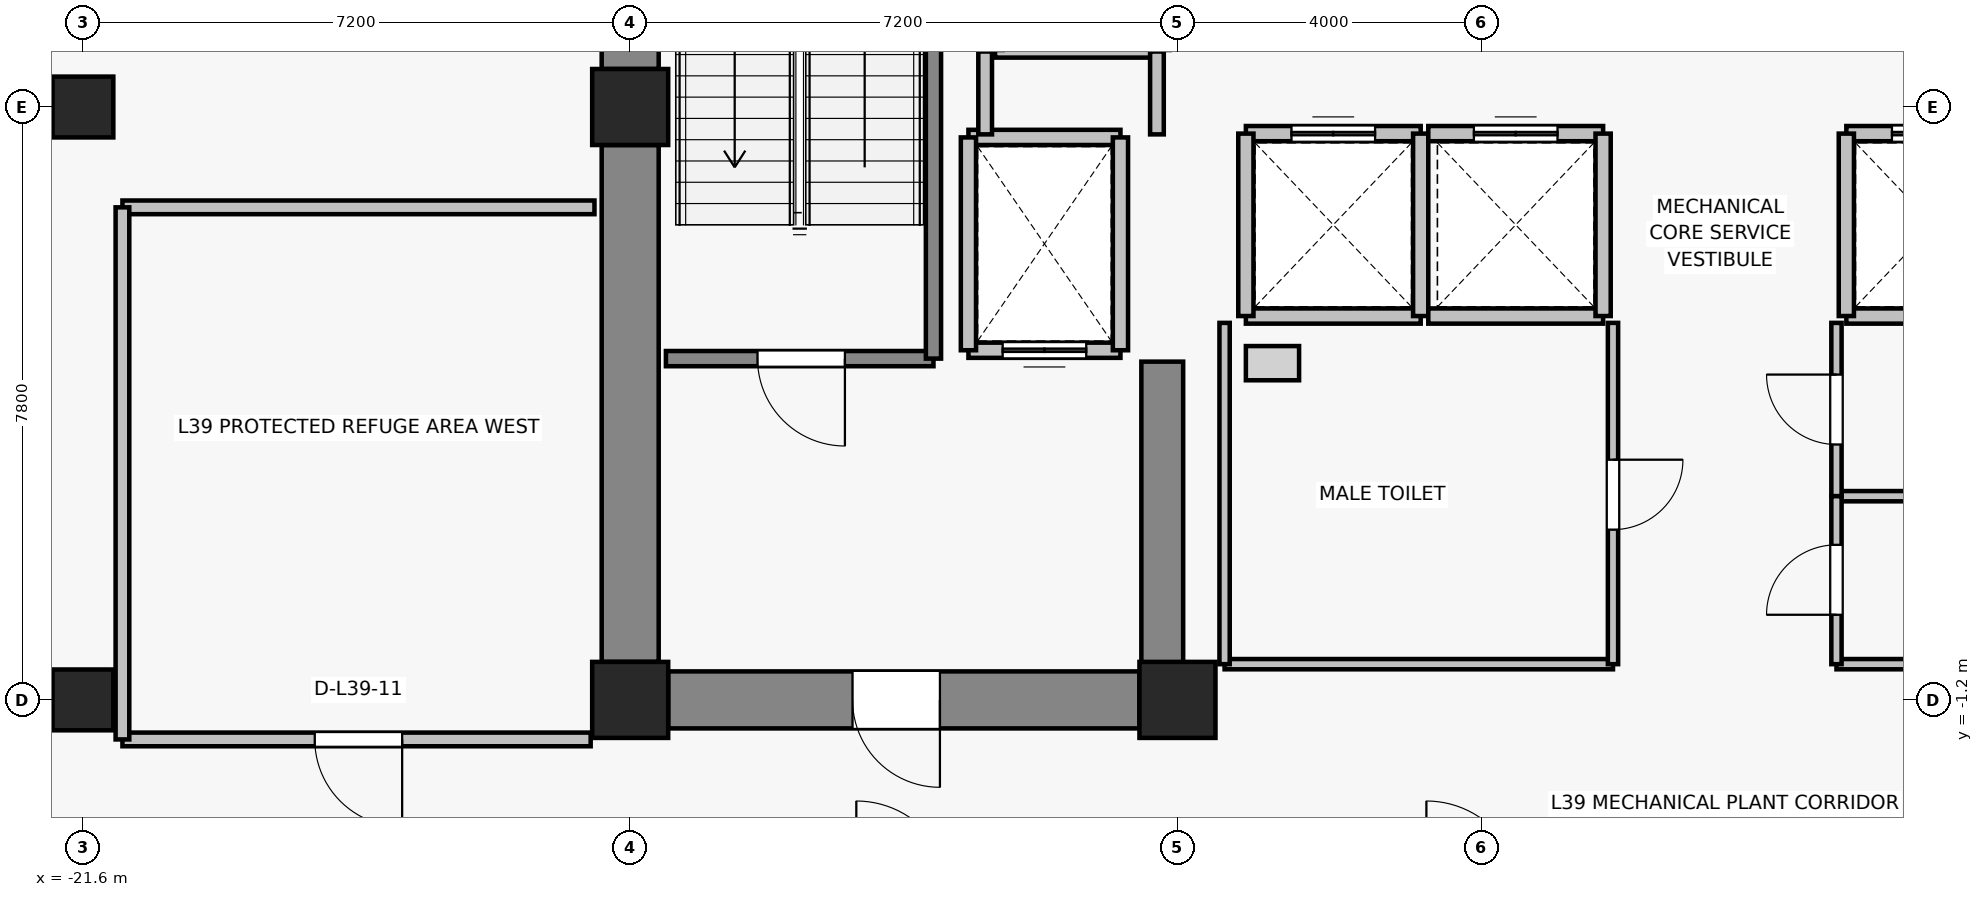
"""IFC4 building model, lengths in metres.
Left out: names, types, materials, properties, quantities, classifications, styles, units other than length and angle.
Written with IfcOpenShell. Run it as: python <this file> out.ifc"""

import sys

from ifc_helpers import new_model, si_unit, direction, frame, frame_2d, origin, origin_2d, place, context, subcontext, project, spatial, rectangle, extrude, source, transform, mapped, element, fill, save


model = new_model("IFC4")
c1 = context("Model", 3, precision=1e-05, world=origin(), true_north=direction((0.0, 1.0)))
c2 = subcontext(c1, "Body", "Model", "MODEL_VIEW")
j1 = project(units=[si_unit("LENGTHUNIT", "METRE"), si_unit("PLANEANGLEUNIT", "RADIAN")], contexts=[c1])
p1 = place(None, origin())
s1 = spatial("IfcSite", under=j1, at=p1, CompositionType="ELEMENT")
p2 = place(p1, origin())
s2 = spatial("IfcBuilding", under=s1, at=p2, CompositionType="ELEMENT")
p3 = place(p2, frame((0.0, 0.0, 139.6)))
s3 = spatial("IfcBuildingStorey", under=s2, at=p3, CompositionType="ELEMENT", Elevation=139.6)
for number, where, z_axis, x_axis in (
    (1, (-14.4, -1.2, 0.0), (0.0, 0.0, 1.0), (1.0, 0.0, 0.0)),
    (2, (-7.2, -1.2, 0.0), (0.0, 0.0, 1.0), (1.0, 0.0, 0.0)),
    (3, (-14.4, 6.6, 0.0), (0.0, 0.0, 1.0), (1.0, 0.0, 0.0)),
):
    element("IfcColumn", number, at=place(p3, frame(where, z_axis=z_axis, x_axis=x_axis)), inside=s3, PredefinedType="COLUMN", context=c2, shape_type="SweptSolid", body=[
        extrude(rectangle(XDim=1.0, YDim=1.0, at=origin_2d()), origin(), (0.0, 0.0, 1.0), 6.6),
    ])
for number, where, z_axis, x_axis in (
    (4, (-21.6, -1.2, 0.0), (0.0, 0.0, 1.0), (1.0, 0.0, 0.0)),
    (5, (-21.6, 6.6, 0.0), (0.0, 0.0, 1.0), (1.0, 0.0, 0.0)),
):
    element("IfcColumn", number, at=place(p3, frame(where, z_axis=z_axis, x_axis=x_axis)), inside=s3, PredefinedType="COLUMN", context=c2, shape_type="SweptSolid", body=[
        extrude(rectangle(XDim=0.8, YDim=0.8, at=origin_2d()), origin(), (0.0, 0.0, 1.0), 6.6),
    ])
p4 = place(p3, frame((-14.4, -0.7, 0.0), z_axis=(0.0, 0.0, 1.0), x_axis=(0.0, 1.0, 0.0)))
e6 = element("IfcWall", 6, at=p4, inside=s3, PredefinedType="SHEAR", context=c2, shape_type="SweptSolid", body=[
    extrude(rectangle(XDim=6.8, YDim=0.75, at=frame_2d((3.4, 0.0))), origin(), (0.0, 0.0, 1.0), 6.375),
])
p5 = place(p3, frame((-14.4, 7.1, 0.0), z_axis=(0.0, 0.0, 1.0), x_axis=(0.0, 1.0, 0.0)))
e7 = element("IfcWall", 7, at=p5, inside=s3, PredefinedType="SHEAR", context=c2, shape_type="SweptSolid", body=[
    extrude(rectangle(XDim=5.9, YDim=0.75, at=frame_2d((2.95, 0.0))), origin(), (0.0, 0.0, 1.0), 6.375),
])
p6 = place(p3, frame((-7.7, -1.2, 0.0), z_axis=(0.0, 0.0, 1.0), x_axis=(-1.0, 0.0, 0.0)))
e8 = element("IfcWall", 8, at=p6, inside=s3, PredefinedType="SHEAR", context=c2, shape_type="SweptSolid", body=[
    extrude(rectangle(XDim=6.2, YDim=0.75, at=frame_2d((3.1, 0.0))), origin(), (0.0, 0.0, 1.0), 6.375),
])
p7 = place(p6, frame((2.625, 0.0, 0.0)))
e9 = element("IfcOpeningElement", 9, at=p7, cuts=e8, PredefinedType="OPENING", context=c2, shape_type="SweptSolid", body=[
    extrude(rectangle(XDim=1.15, YDim=2.15, at=frame_2d((0.575, 1.075))), frame((0.0, 0.385, 0.0), z_axis=(0.0, -1.0, 0.0), x_axis=(1.0, 0.0, 0.0)), (0.0, 0.0, 1.0), 0.77),
])
p8 = place(p3, frame((-7.4, -0.825, 0.0), z_axis=(0.0, 0.0, 1.0), x_axis=(0.0, 1.0, 0.0)))
e10 = element("IfcWall", 10, at=p8, inside=s3, PredefinedType="SHEAR", context=c2, shape_type="SweptSolid", body=[
    extrude(rectangle(XDim=4.075, YDim=0.55, at=frame_2d((2.038, 0.0))), origin(), (0.0, 0.0, 1.0), 6.375),
])
p9 = place(p3, frame((-7.95, 3.4, 0.0), z_axis=(0.0, 0.0, 1.0), x_axis=(-1.0, 0.0, 0.0)))
e11 = element("IfcWall", 11, at=p9, inside=s3, PredefinedType="SOLIDWALL", context=c2, shape_type="SweptSolid", body=[
    extrude(rectangle(XDim=2.0, YDim=0.2, at=frame_2d((1.0, 0.0))), origin(), (0.0, 0.0, 1.0), 6.375),
])
p10 = place(p9, frame((0.45, 0.0, 0.0)))
e12 = element("IfcOpeningElement", 12, at=p10, cuts=e11, PredefinedType="OPENING", context=c2, shape_type="SweptSolid", body=[
    extrude(rectangle(XDim=1.1, YDim=2.2, at=frame_2d((0.55, 1.1))), frame((0.0, 0.11, 0.0), z_axis=(0.0, -1.0, 0.0), x_axis=(1.0, 0.0, 0.0)), (0.0, 0.0, 1.0), 0.22),
])
p11 = place(p3, frame((-9.95, 6.2, 0.0), z_axis=(0.0, 0.0, 1.0), x_axis=(1.0, 0.0, 0.0)))
e13 = element("IfcWall", 13, at=p11, inside=s3, PredefinedType="SOLIDWALL", context=c2, shape_type="SweptSolid", body=[
    extrude(rectangle(XDim=2.0, YDim=0.2, at=frame_2d((1.0, 0.0))), origin(), (0.0, 0.0, 1.0), 6.375),
])
for number, where, z_axis, x_axis in (
    (14, (-9.95, 3.4, 0.0), (0.0, 0.0, 1.0), (0.0, 1.0, 0.0)),
    (15, (-7.95, 6.2, 0.0), (0.0, 0.0, 1.0), (0.0, -1.0, 0.0)),
):
    element("IfcWall", number, at=place(p3, frame(where, z_axis=z_axis, x_axis=x_axis)), inside=s3, PredefinedType="SOLIDWALL", context=c2, shape_type="SweptSolid", body=[
        extrude(rectangle(XDim=2.8, YDim=0.2, at=frame_2d((1.4, 0.0))), origin(), (0.0, 0.0, 1.0), 6.375),
    ])
p12 = place(p3, frame((-4.0, 3.85, 0.0), z_axis=(0.0, 0.0, 1.0), x_axis=(-1.0, 0.0, 0.0)))
e16 = element("IfcWall", 16, at=p12, inside=s3, PredefinedType="SOLIDWALL", context=c2, shape_type="SweptSolid", body=[
    extrude(rectangle(XDim=2.3, YDim=0.2, at=frame_2d((1.15, 0.0))), origin(), (0.0, 0.0, 1.0), 6.375),
])
p13 = place(p3, frame((-6.3, 6.25, 0.0), z_axis=(0.0, 0.0, 1.0), x_axis=(1.0, 0.0, 0.0)))
e17 = element("IfcWall", 17, at=p13, inside=s3, PredefinedType="SOLIDWALL", context=c2, shape_type="SweptSolid", body=[
    extrude(rectangle(XDim=2.3, YDim=0.2, at=frame_2d((1.15, 0.0))), origin(), (0.0, 0.0, 1.0), 6.375),
])
p14 = place(p13, frame((0.6, 0.0, 0.0)))
e18 = element("IfcOpeningElement", 18, at=p14, cuts=e17, PredefinedType="OPENING", context=c2, shape_type="SweptSolid", body=[
    extrude(rectangle(XDim=1.1, YDim=2.2, at=frame_2d((0.55, 1.1))), frame((0.0, 0.11, 0.0), z_axis=(0.0, -1.0, 0.0), x_axis=(1.0, 0.0, 0.0)), (0.0, 0.0, 1.0), 0.22),
])
for number, where, z_axis, x_axis in (
    (19, (-6.3, 3.85, 0.0), (0.0, 0.0, 1.0), (0.0, 1.0, 0.0)),
    (20, (-4.0, 6.25, 0.0), (0.0, 0.0, 1.0), (0.0, -1.0, 0.0)),
):
    element("IfcWall", number, at=place(p3, frame(where, z_axis=z_axis, x_axis=x_axis)), inside=s3, PredefinedType="SOLIDWALL", context=c2, shape_type="SweptSolid", body=[
        extrude(rectangle(XDim=2.4, YDim=0.2, at=frame_2d((1.2, 0.0))), origin(), (0.0, 0.0, 1.0), 6.375),
    ])
p15 = place(p3, frame((-1.6, 3.85, 0.0), z_axis=(0.0, 0.0, 1.0), x_axis=(-1.0, 0.0, 0.0)))
e21 = element("IfcWall", 21, at=p15, inside=s3, PredefinedType="SOLIDWALL", context=c2, shape_type="SweptSolid", body=[
    extrude(rectangle(XDim=2.3, YDim=0.2, at=frame_2d((1.15, 0.0))), origin(), (0.0, 0.0, 1.0), 6.375),
])
p16 = place(p3, frame((-3.9, 6.25, 0.0), z_axis=(0.0, 0.0, 1.0), x_axis=(1.0, 0.0, 0.0)))
e22 = element("IfcWall", 22, at=p16, inside=s3, PredefinedType="SOLIDWALL", context=c2, shape_type="SweptSolid", body=[
    extrude(rectangle(XDim=2.3, YDim=0.2, at=frame_2d((1.15, 0.0))), origin(), (0.0, 0.0, 1.0), 6.375),
])
p17 = place(p16, frame((0.6, 0.0, 0.0)))
e23 = element("IfcOpeningElement", 23, at=p17, cuts=e22, PredefinedType="OPENING", context=c2, shape_type="SweptSolid", body=[
    extrude(rectangle(XDim=1.1, YDim=2.2, at=frame_2d((0.55, 1.1))), frame((0.0, 0.11, 0.0), z_axis=(0.0, -1.0, 0.0), x_axis=(1.0, 0.0, 0.0)), (0.0, 0.0, 1.0), 0.22),
])
p18 = place(p3, frame((-1.6, 6.25, 0.0), z_axis=(0.0, 0.0, 1.0), x_axis=(0.0, -1.0, 0.0)))
e24 = element("IfcWall", 24, at=p18, inside=s3, PredefinedType="SOLIDWALL", context=c2, shape_type="SweptSolid", body=[
    extrude(rectangle(XDim=2.4, YDim=0.2, at=frame_2d((1.2, 0.0))), origin(), (0.0, 0.0, 1.0), 6.375),
])
p19 = place(p3, frame((3.9, 3.85, 0.0), z_axis=(0.0, 0.0, 1.0), x_axis=(-1.0, 0.0, 0.0)))
e25 = element("IfcWall", 25, at=p19, inside=s3, PredefinedType="SOLIDWALL", context=c2, shape_type="SweptSolid", body=[
    extrude(rectangle(XDim=2.3, YDim=0.2, at=frame_2d((1.15, 0.0))), origin(), (0.0, 0.0, 1.0), 6.375),
])
p20 = place(p3, frame((1.6, 6.25, 0.0), z_axis=(0.0, 0.0, 1.0), x_axis=(1.0, 0.0, 0.0)))
e26 = element("IfcWall", 26, at=p20, inside=s3, PredefinedType="SOLIDWALL", context=c2, shape_type="SweptSolid", body=[
    extrude(rectangle(XDim=2.3, YDim=0.2, at=frame_2d((1.15, 0.0))), origin(), (0.0, 0.0, 1.0), 6.375),
])
p21 = place(p20, frame((0.6, 0.0, 0.0)))
e27 = element("IfcOpeningElement", 27, at=p21, cuts=e26, PredefinedType="OPENING", context=c2, shape_type="SweptSolid", body=[
    extrude(rectangle(XDim=1.1, YDim=2.2, at=frame_2d((0.55, 1.1))), frame((0.0, 0.11, 0.0), z_axis=(0.0, -1.0, 0.0), x_axis=(1.0, 0.0, 0.0)), (0.0, 0.0, 1.0), 0.22),
])
p22 = place(p3, frame((1.6, 3.85, 0.0), z_axis=(0.0, 0.0, 1.0), x_axis=(0.0, 1.0, 0.0)))
e28 = element("IfcWall", 28, at=p22, inside=s3, PredefinedType="SOLIDWALL", context=c2, shape_type="SweptSolid", body=[
    extrude(rectangle(XDim=2.4, YDim=0.2, at=frame_2d((1.2, 0.0))), origin(), (0.0, 0.0, 1.0), 6.375),
])
p23 = place(p3, frame((-7.4, 7.35, 0.0), z_axis=(0.0, 0.0, 1.0), x_axis=(-1.0, 0.0, 0.0)))
e29 = element("IfcWall", 29, at=p23, inside=s3, PredefinedType="SOLIDWALL", context=c2, shape_type="SweptSolid", body=[
    extrude(rectangle(XDim=2.2, YDim=0.2, at=frame_2d((1.1, 0.0))), origin(), (0.0, 0.0, 1.0), 5.865),
])
p24 = place(p3, frame((-10.41, 3.29, 0.0), z_axis=(0.0, 0.0, 1.0), x_axis=(-1.0, 0.0, 0.0)))
e30 = element("IfcWall", 30, at=p24, inside=s3, PredefinedType="SOLIDWALL", context=c2, shape_type="SweptSolid", body=[
    extrude(rectangle(XDim=3.52, YDim=0.2, at=frame_2d((1.76, 0.0))), origin(), (0.0, 0.0, 1.0), 6.375),
])
p25 = place(p24, frame((1.165, 0.0, 0.0)))
e31 = element("IfcOpeningElement", 31, at=p25, cuts=e30, PredefinedType="OPENING", context=c2, shape_type="SweptSolid", body=[
    extrude(rectangle(XDim=1.15, YDim=2.15, at=frame_2d((0.575, 1.075))), frame((0.0, 0.11, 0.0), z_axis=(0.0, -1.0, 0.0), x_axis=(1.0, 0.0, 0.0)), (0.0, 0.0, 1.0), 0.22),
])
p26 = place(p3, frame((-10.41, 12.13, 0.0), z_axis=(0.0, 0.0, 1.0), x_axis=(0.0, -1.0, 0.0)))
e32 = element("IfcWall", 32, at=p26, inside=s3, PredefinedType="SOLIDWALL", context=c2, shape_type="SweptSolid", body=[
    extrude(rectangle(XDim=8.84, YDim=0.2, at=frame_2d((4.42, 0.0))), origin(), (0.0, 0.0, 1.0), 6.375),
])
p27 = place(p3, frame((-9.73, 6.24, 0.0), z_axis=(0.0, 0.0, 1.0), x_axis=(0.0, 1.0, 0.0)))
e33 = element("IfcWall", 33, at=p27, inside=s3, PredefinedType="PARTITIONING", context=c2, shape_type="SweptSolid", body=[
    extrude(rectangle(XDim=1.09, YDim=0.18, at=frame_2d((0.545, 0.0))), origin(), (0.0, 0.0, 1.0), 6.375),
])
p28 = place(p3, frame((-7.47, 7.33, 0.0), z_axis=(0.0, 0.0, 1.0), x_axis=(0.0, -1.0, 0.0)))
e34 = element("IfcWall", 34, at=p28, inside=s3, PredefinedType="PARTITIONING", context=c2, shape_type="SweptSolid", body=[
    extrude(rectangle(XDim=1.09, YDim=0.18, at=frame_2d((0.545, 0.0))), origin(), (0.0, 0.0, 1.0), 5.865),
])
p29 = place(p3, frame((-1.47, -0.73, 0.0), z_axis=(0.0, 0.0, 1.0), x_axis=(-1.0, 0.0, 0.0)))
e35 = element("IfcWall", 35, at=p29, inside=s3, PredefinedType="PARTITIONING", context=c2, shape_type="SweptSolid", body=[
    extrude(rectangle(XDim=5.11, YDim=0.135, at=frame_2d((2.555, 0.0))), origin(), (0.0, 0.0, 1.0), 6.375),
])
p30 = place(p3, frame((-6.58, -0.73, 0.0), z_axis=(0.0, 0.0, 1.0), x_axis=(0.0, 1.0, 0.0)))
e36 = element("IfcWall", 36, at=p30, inside=s3, PredefinedType="PARTITIONING", context=c2, shape_type="SweptSolid", body=[
    extrude(rectangle(XDim=4.49, YDim=0.135, at=frame_2d((2.245, 0.0))), origin(), (0.0, 0.0, 1.0), 6.375),
])
p31 = place(p3, frame((-1.47, 3.76, 0.0), z_axis=(0.0, 0.0, 1.0), x_axis=(0.0, -1.0, 0.0)))
e37 = element("IfcWall", 37, at=p31, inside=s3, PredefinedType="PARTITIONING", context=c2, shape_type="SweptSolid", body=[
    extrude(rectangle(XDim=4.49, YDim=0.135, at=frame_2d((2.245, 0.0))), origin(), (0.0, 0.0, 1.0), 6.375),
])
p32 = place(p31, frame((1.8, 0.0, 0.0)))
e38 = element("IfcOpeningElement", 38, at=p32, cuts=e37, PredefinedType="OPENING", context=c2, shape_type="SweptSolid", body=[
    extrude(rectangle(XDim=0.92, YDim=2.1, at=frame_2d((0.46, 1.05))), frame((0.0, 0.077, 0.0), z_axis=(0.0, -1.0, 0.0), x_axis=(1.0, 0.0, 0.0)), (0.0, 0.0, 1.0), 0.155),
])
p33 = place(p3, frame((6.58, 1.48, 0.0), z_axis=(0.0, 0.0, 1.0), x_axis=(-1.0, 0.0, 0.0)))
e39 = element("IfcWall", 39, at=p33, inside=s3, PredefinedType="PARTITIONING", context=c2, shape_type="SweptSolid", body=[
    extrude(rectangle(XDim=5.11, YDim=0.135, at=frame_2d((2.555, 0.0))), origin(), (0.0, 0.0, 1.0), 6.375),
])
p34 = place(p3, frame((1.47, 1.48, 0.0), z_axis=(0.0, 0.0, 1.0), x_axis=(0.0, 1.0, 0.0)))
e40 = element("IfcWall", 40, at=p34, inside=s3, PredefinedType="PARTITIONING", context=c2, shape_type="SweptSolid", body=[
    extrude(rectangle(XDim=2.28, YDim=0.135, at=frame_2d((1.14, 0.0))), origin(), (0.0, 0.0, 1.0), 6.375),
])
p35 = place(p34, frame((0.68, 0.0, 0.0)))
e41 = element("IfcOpeningElement", 41, at=p35, cuts=e40, PredefinedType="OPENING", context=c2, shape_type="SweptSolid", body=[
    extrude(rectangle(XDim=0.92, YDim=2.1, at=frame_2d((0.46, 1.05))), frame((0.0, 0.077, 0.0), z_axis=(0.0, -1.0, 0.0), x_axis=(1.0, 0.0, 0.0)), (0.0, 0.0, 1.0), 0.155),
])
p36 = place(p3, frame((4.18, -0.73, 0.0), z_axis=(0.0, 0.0, 1.0), x_axis=(-1.0, 0.0, 0.0)))
e42 = element("IfcWall", 42, at=p36, inside=s3, PredefinedType="PARTITIONING", context=c2, shape_type="SweptSolid", body=[
    extrude(rectangle(XDim=2.71, YDim=0.135, at=frame_2d((1.355, 0.0))), origin(), (0.0, 0.0, 1.0), 6.375),
])
p37 = place(p3, frame((1.47, -0.73, 0.0), z_axis=(0.0, 0.0, 1.0), x_axis=(0.0, 1.0, 0.0)))
e43 = element("IfcWall", 43, at=p37, inside=s3, PredefinedType="PARTITIONING", context=c2, shape_type="SweptSolid", body=[
    extrude(rectangle(XDim=2.21, YDim=0.135, at=frame_2d((1.105, 0.0))), origin(), (0.0, 0.0, 1.0), 6.375),
])
p38 = place(p37, frame((0.65, 0.0, 0.0)))
e44 = element("IfcOpeningElement", 44, at=p38, cuts=e43, PredefinedType="OPENING", context=c2, shape_type="SweptSolid", body=[
    extrude(rectangle(XDim=0.92, YDim=2.1, at=frame_2d((0.46, 1.05))), frame((0.0, 0.077, 0.0), z_axis=(0.0, -1.0, 0.0), x_axis=(1.0, 0.0, 0.0)), (0.0, 0.0, 1.0), 0.155),
])
p39 = place(p3, frame((-14.92, -1.72, 0.0), z_axis=(0.0, 0.0, 1.0), x_axis=(-1.0, 0.0, 0.0)))
e45 = element("IfcWall", 45, at=p39, inside=s3, PredefinedType="PARTITIONING", context=c2, shape_type="SweptSolid", body=[
    extrude(rectangle(XDim=6.16, YDim=0.18, at=frame_2d((3.08, 0.0))), origin(), (0.0, 0.0, 1.0), 6.375),
])
p40 = place(p39, frame((2.48, 0.0, 0.0)))
e46 = element("IfcOpeningElement", 46, at=p40, cuts=e45, PredefinedType="OPENING", context=c2, shape_type="SweptSolid", body=[
    extrude(rectangle(XDim=1.15, YDim=2.15, at=frame_2d((0.575, 1.075))), frame((0.0, 0.1, 0.0), z_axis=(0.0, -1.0, 0.0), x_axis=(1.0, 0.0, 0.0)), (0.0, 0.0, 1.0), 0.2),
])
p41 = place(p3, frame((-21.08, 5.28, 0.0), z_axis=(0.0, 0.0, 1.0), x_axis=(1.0, 0.0, 0.0)))
e47 = element("IfcWall", 47, at=p41, inside=s3, PredefinedType="PARTITIONING", context=c2, shape_type="SweptSolid", body=[
    extrude(rectangle(XDim=6.21, YDim=0.18, at=frame_2d((3.105, 0.0))), origin(), (0.0, 0.0, 1.0), 6.375),
])
p42 = place(p3, frame((-21.08, -1.72, 0.0), z_axis=(0.0, 0.0, 1.0), x_axis=(0.0, 1.0, 0.0)))
e48 = element("IfcWall", 48, at=p42, inside=s3, PredefinedType="PARTITIONING", context=c2, shape_type="SweptSolid", body=[
    extrude(rectangle(XDim=7.0, YDim=0.18, at=frame_2d((3.5, 0.0))), origin(), (0.0, 0.0, 1.0), 6.375),
])
m1 = source(origin(), c2, "Body", "SweptSolid", [
    extrude(rectangle(XDim=1.1, YDim=2.2, at=frame_2d((0.55, 1.1))), frame((0.0, 0.025, 0.0), z_axis=(0.0, -1.0, 0.0), x_axis=(1.0, 0.0, 0.0)), (0.0, 0.0, 1.0), 0.05),
])
p43 = place(p10, origin())
e49 = element("IfcDoor", 49, at=p43, inside=s3, OperationType="DOUBLE_DOOR_SLIDING", PredefinedType="DOOR", context=c2, shape_type="MappedRepresentation", body=[
    mapped(m1, transform((0.0, 0.0, 0.0), x_axis=(1.0, 0.0, 0.0), y_axis=(0.0, 1.0, 0.0), z_axis=(0.0, 0.0, 1.0), scale=1.0)),
])
fill(e12, e49)
p44 = place(p14, origin())
e50 = element("IfcDoor", 50, at=p44, inside=s3, OperationType="DOUBLE_DOOR_SLIDING", PredefinedType="DOOR", context=c2, shape_type="MappedRepresentation", body=[
    mapped(m1, transform((0.0, 0.0, 0.0), x_axis=(1.0, 0.0, 0.0), y_axis=(0.0, 1.0, 0.0), z_axis=(0.0, 0.0, 1.0), scale=1.0)),
])
fill(e18, e50)
p45 = place(p17, origin())
e51 = element("IfcDoor", 51, at=p45, inside=s3, OperationType="DOUBLE_DOOR_SLIDING", PredefinedType="DOOR", context=c2, shape_type="MappedRepresentation", body=[
    mapped(m1, transform((0.0, 0.0, 0.0), x_axis=(1.0, 0.0, 0.0), y_axis=(0.0, 1.0, 0.0), z_axis=(0.0, 0.0, 1.0), scale=1.0)),
])
fill(e23, e51)
p46 = place(p21, origin())
e52 = element("IfcDoor", 52, at=p46, inside=s3, OperationType="DOUBLE_DOOR_SLIDING", PredefinedType="DOOR", context=c2, shape_type="MappedRepresentation", body=[
    mapped(m1, transform((0.0, 0.0, 0.0), x_axis=(1.0, 0.0, 0.0), y_axis=(0.0, 1.0, 0.0), z_axis=(0.0, 0.0, 1.0), scale=1.0)),
])
fill(e27, e52)
m2 = source(origin(), c2, "Body", "SweptSolid", [
    extrude(rectangle(XDim=1.15, YDim=2.15, at=frame_2d((0.575, 1.075))), frame((0.0, 0.025, 0.0), z_axis=(0.0, -1.0, 0.0), x_axis=(1.0, 0.0, 0.0)), (0.0, 0.0, 1.0), 0.05),
])
p47 = place(p25, origin())
e53 = element("IfcDoor", 53, at=p47, inside=s3, OperationType="SINGLE_SWING_LEFT", PredefinedType="DOOR", context=c2, shape_type="MappedRepresentation", body=[
    mapped(m2, transform((0.0, 0.0, 0.0), x_axis=(1.0, 0.0, 0.0), y_axis=(0.0, 1.0, 0.0), z_axis=(0.0, 0.0, 1.0), scale=1.0)),
])
fill(e31, e53)
p48 = place(p7, origin())
e54 = element("IfcDoor", 54, at=p48, inside=s3, OperationType="SINGLE_SWING_LEFT", PredefinedType="DOOR", context=c2, shape_type="MappedRepresentation", body=[
    mapped(m2, transform((0.0, 0.0, 0.0), x_axis=(1.0, 0.0, 0.0), y_axis=(0.0, 1.0, 0.0), z_axis=(0.0, 0.0, 1.0), scale=1.0)),
])
fill(e9, e54)
m3 = source(origin(), c2, "Body", "SweptSolid", [
    extrude(rectangle(XDim=0.92, YDim=2.1, at=frame_2d((0.46, 1.05))), frame((0.0, 0.025, 0.0), z_axis=(0.0, -1.0, 0.0), x_axis=(1.0, 0.0, 0.0)), (0.0, 0.0, 1.0), 0.05),
])
p49 = place(p32, origin())
e55 = element("IfcDoor", 55, at=p49, inside=s3, OperationType="SINGLE_SWING_LEFT", PredefinedType="DOOR", context=c2, shape_type="MappedRepresentation", body=[
    mapped(m3, transform((0.0, 0.0, 0.0), x_axis=(1.0, 0.0, 0.0), y_axis=(0.0, 1.0, 0.0), z_axis=(0.0, 0.0, 1.0), scale=1.0)),
])
fill(e38, e55)
p50 = place(p35, origin())
e56 = element("IfcDoor", 56, at=p50, inside=s3, OperationType="SINGLE_SWING_RIGHT", PredefinedType="DOOR", context=c2, shape_type="MappedRepresentation", body=[
    mapped(m3, transform((0.0, 0.0, 0.0), x_axis=(1.0, 0.0, 0.0), y_axis=(0.0, 1.0, 0.0), z_axis=(0.0, 0.0, 1.0), scale=1.0)),
])
fill(e41, e56)
p51 = place(p38, origin())
e57 = element("IfcDoor", 57, at=p51, inside=s3, OperationType="SINGLE_SWING_LEFT", PredefinedType="DOOR", context=c2, shape_type="MappedRepresentation", body=[
    mapped(m3, transform((0.0, 0.0, 0.0), x_axis=(1.0, 0.0, 0.0), y_axis=(0.0, 1.0, 0.0), z_axis=(0.0, 0.0, 1.0), scale=1.0)),
])
fill(e44, e57)
p52 = place(p40, origin())
e58 = element("IfcDoor", 58, at=p52, inside=s3, OperationType="SINGLE_SWING_LEFT", PredefinedType="DOOR", context=c2, shape_type="MappedRepresentation", body=[
    mapped(m2, transform((0.0, 0.0, 0.0), x_axis=(1.0, 0.0, 0.0), y_axis=(0.0, 1.0, 0.0), z_axis=(0.0, 0.0, 1.0), scale=1.0)),
])
fill(e46, e58)
save(model, sys.argv[1])
